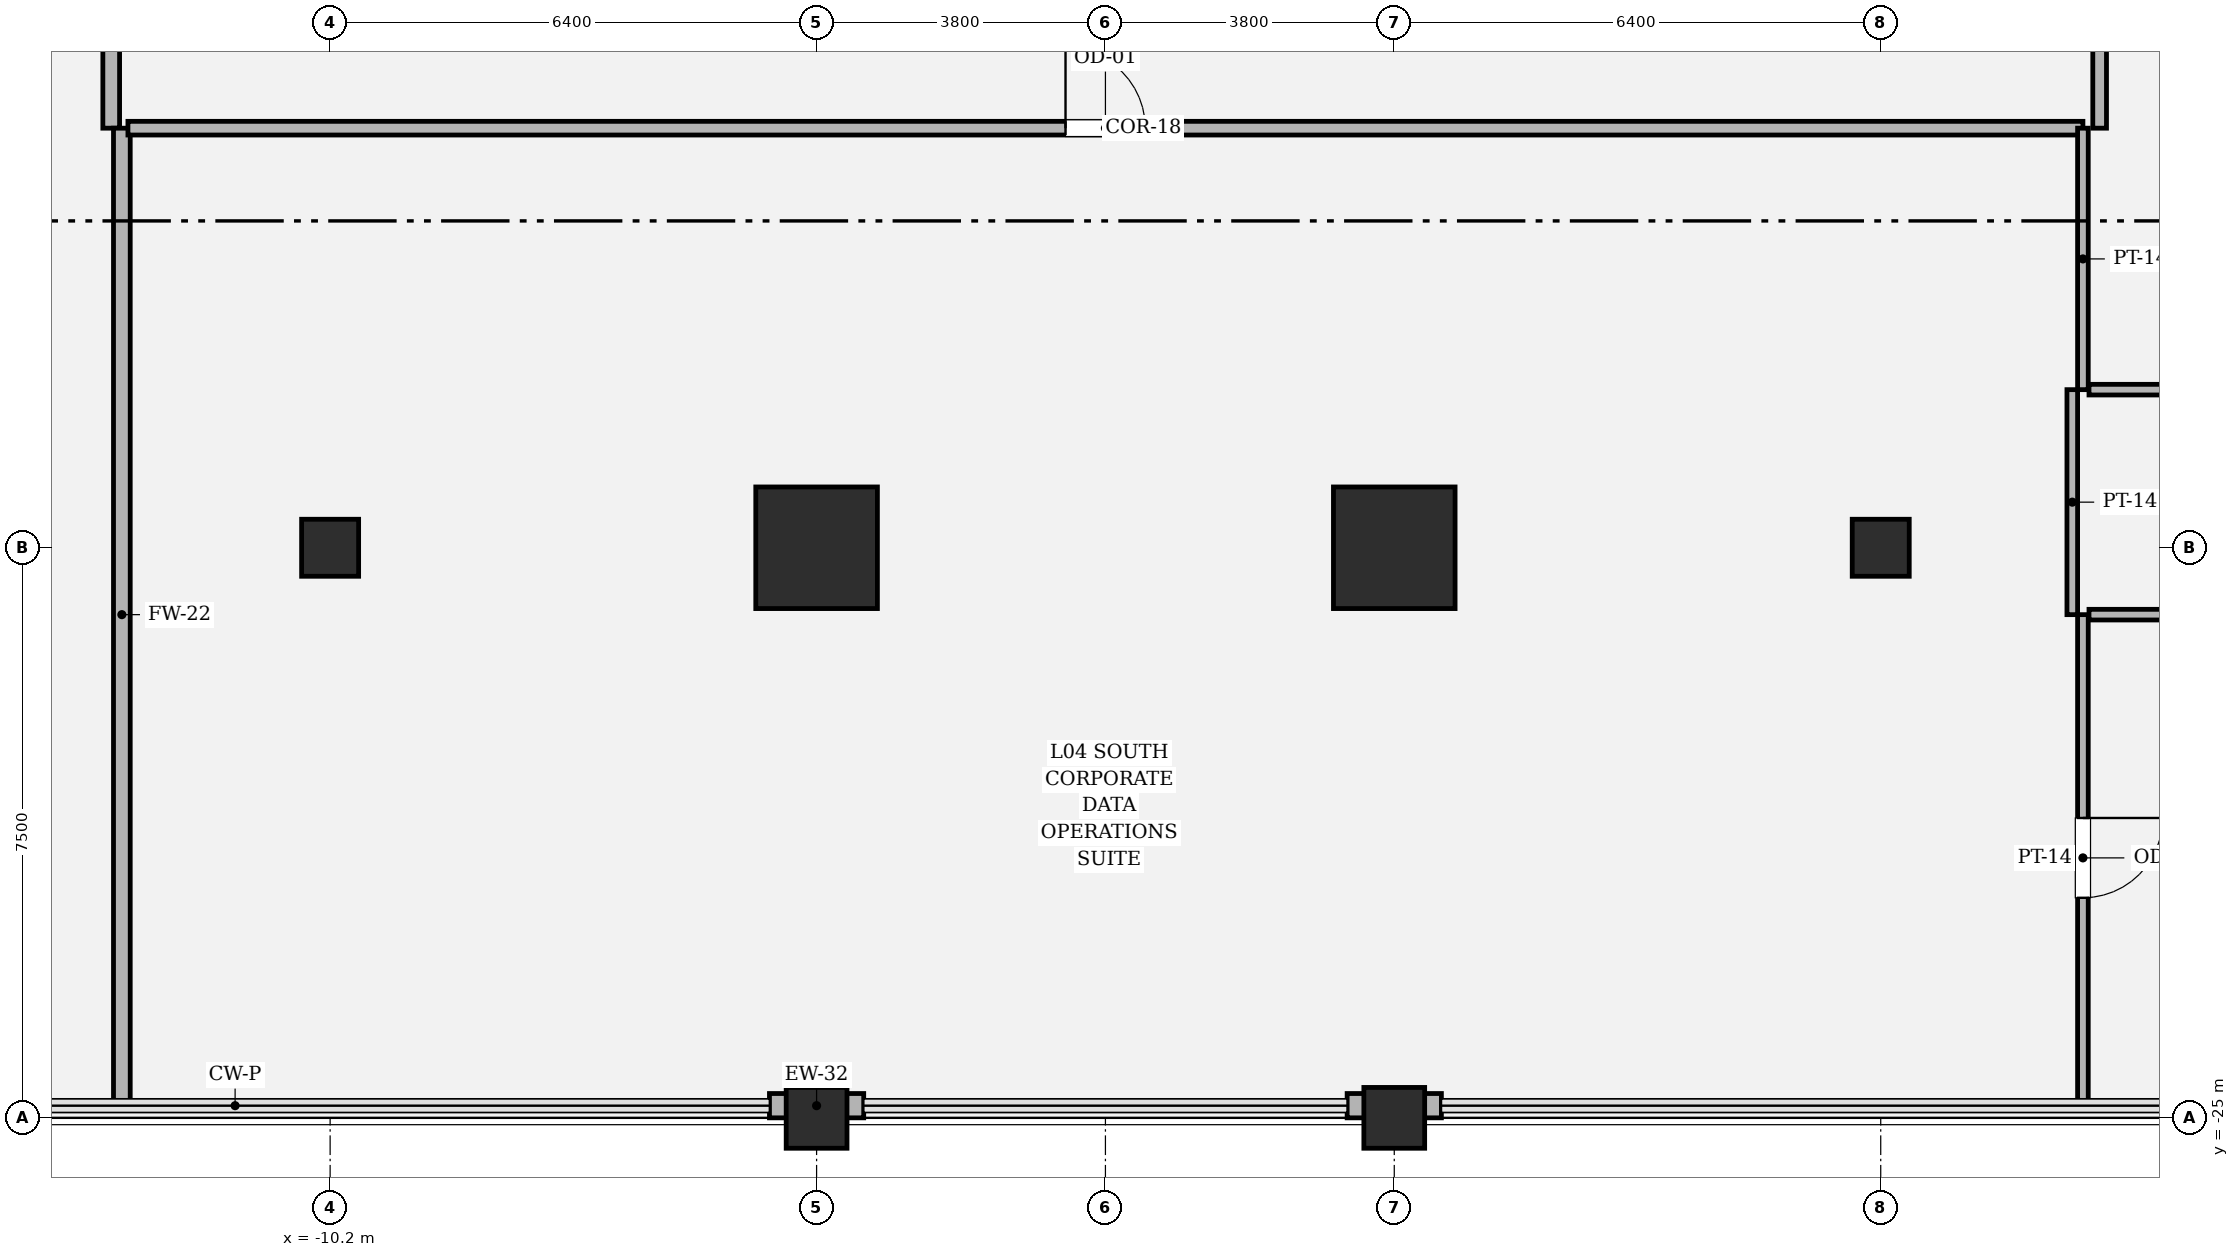
"""IFC4 building model, lengths in metres.
Left out: names, types, materials, properties, quantities, classifications, styles, units other than length and angle.
Written with IfcOpenShell. Run it as: python <this file> out.ifc"""

import sys

from ifc_helpers import new_model, si_unit, direction, frame, frame_2d, origin, origin_2d, place, context, subcontext, project, spatial, rectangle, hollow_rectangle, circle, extrude, element, fill, save


model = new_model("IFC4")
c1 = context("Model", 3, precision=1e-05, world=origin(), true_north=direction((0.0, 1.0)))
c2 = subcontext(c1, "Body", "Model", "MODEL_VIEW")
j1 = project(units=[si_unit("LENGTHUNIT", "METRE"), si_unit("PLANEANGLEUNIT", "RADIAN")], contexts=[c1])
p1 = place(None, origin())
s1 = spatial("IfcSite", under=j1, at=p1, CompositionType="ELEMENT")
p2 = place(p1, origin())
s2 = spatial("IfcBuilding", under=s1, at=p2, CompositionType="ELEMENT")
p3 = place(p2, frame((0.0, 0.0, 22.2)))
s3 = spatial("IfcBuildingStorey", under=s2, at=p3, CompositionType="ELEMENT", Elevation=22.2)
for number, where, z_axis, x_axis in (
    (1, (-3.8, -17.5, 0.0), (0.0, 0.0, 1.0), (1.0, 0.0, 0.0)),
    (2, (3.8, -17.5, 0.0), (0.0, 0.0, 1.0), (1.0, 0.0, 0.0)),
):
    element("IfcColumn", number, at=place(p3, frame(where, z_axis=z_axis, x_axis=x_axis)), inside=s3, PredefinedType="COLUMN", context=c2, shape_type="SweptSolid", body=[
        extrude(hollow_rectangle(XDim=1.6, YDim=1.6, WallThickness=0.05, at=origin_2d()), origin(), (0.0, 0.0, 1.0), 6.0),
    ])
for number, where, z_axis, x_axis in (
    (3, (-3.8, -25.0, 0.0), (0.0, 0.0, 1.0), (1.0, 0.0, 0.0)),
    (4, (3.8, -25.0, 0.0), (0.0, 0.0, 1.0), (1.0, 0.0, 0.0)),
):
    element("IfcColumn", number, at=place(p3, frame(where, z_axis=z_axis, x_axis=x_axis)), inside=s3, PredefinedType="COLUMN", context=c2, shape_type="SweptSolid", body=[
        extrude(rectangle(XDim=0.8, YDim=0.8, at=origin_2d()), origin(), (0.0, 0.0, 1.0), 6.0),
    ])
for number, where, z_axis, x_axis in (
    (5, (-10.2, -17.5, 0.0), (0.0, 0.0, 1.0), (1.0, 0.0, 0.0)),
    (6, (10.2, -17.5, 0.0), (0.0, 0.0, 1.0), (1.0, 0.0, 0.0)),
):
    element("IfcColumn", number, at=place(p3, frame(where, z_axis=z_axis, x_axis=x_axis)), inside=s3, PredefinedType="PILASTER", context=c2, shape_type="SweptSolid", body=[
        extrude(circle(Radius=0.375, at=origin_2d()), origin(), (0.0, 0.0, 1.0), 6.0),
    ])
for number, where, z_axis, x_axis in (
    (7, (-4.42, -24.84, 0.0), (0.0, 0.0, 1.0), (1.0, 0.0, 0.0)),
    (8, (3.18, -24.84, 0.0), (0.0, 0.0, 1.0), (1.0, 0.0, 0.0)),
):
    element("IfcWall", number, at=place(p3, frame(where, z_axis=z_axis, x_axis=x_axis)), inside=s3, PredefinedType="SOLIDWALL", context=c2, shape_type="SweptSolid", body=[
        extrude(rectangle(XDim=1.24, YDim=0.32, at=frame_2d((0.62, 0.0))), origin(), (0.0, 0.0, 1.0), 5.72),
    ])
p4 = place(p3, frame((-13.08, -1.38, 0.0), z_axis=(0.0, 0.0, 1.0), x_axis=(0.0, -1.0, 0.0)))
e9 = element("IfcWall", 9, at=p4, inside=s3, PredefinedType="SOLIDWALL", context=c2, shape_type="SweptSolid", body=[
    extrude(rectangle(XDim=10.6, YDim=0.22, at=frame_2d((5.3, 0.0))), origin(), (0.0, 0.0, 1.0), 4.394),
])
p5 = place(p3, frame((-12.94, -11.98, 0.0), z_axis=(0.0, 0.0, 1.0), x_axis=(0.0, -1.0, 0.0)))
e10 = element("IfcWall", 10, at=p5, inside=s3, PredefinedType="SOLIDWALL", context=c2, shape_type="SweptSolid", body=[
    extrude(rectangle(XDim=12.8, YDim=0.22, at=frame_2d((6.4, 0.0))), origin(), (0.0, 0.0, 1.0), 4.394),
])
p6 = place(p3, frame((-12.86, -11.98, 0.0), z_axis=(0.0, 0.0, 1.0), x_axis=(1.0, 0.0, 0.0)))
e11 = element("IfcWall", 11, at=p6, inside=s3, PredefinedType="PARTITIONING", context=c2, shape_type="SweptSolid", body=[
    extrude(rectangle(XDim=25.72, YDim=0.18, at=frame_2d((12.86, 0.0))), origin(), (0.0, 0.0, 1.0), 4.394),
])
p7 = place(p6, frame((12.335, 0.0, 0.0)))
e12 = element("IfcOpeningElement", 12, at=p7, cuts=e11, PredefinedType="OPENING", context=c2, shape_type="SweptSolid", body=[
    extrude(rectangle(XDim=1.05, YDim=2.2, at=frame_2d((0.525, 1.1))), frame((0.0, 0.1, 0.0), z_axis=(0.0, -1.0, 0.0), x_axis=(1.0, 0.0, 0.0)), (0.0, 0.0, 1.0), 0.2),
])
p8 = place(p3, frame((12.86, -11.98, 0.0), z_axis=(0.0, 0.0, 1.0), x_axis=(0.0, -1.0, 0.0)))
e13 = element("IfcWall", 13, at=p8, inside=s3, PredefinedType="PARTITIONING", context=c2, shape_type="SweptSolid", body=[
    extrude(rectangle(XDim=3.44, YDim=0.14, at=frame_2d((1.72, 0.0))), origin(), (0.0, 0.0, 1.0), 5.264),
])
p9 = place(p3, frame((12.72, -15.42, 0.0), z_axis=(0.0, 0.0, 1.0), x_axis=(0.0, -1.0, 0.0)))
e14 = element("IfcWall", 14, at=p9, inside=s3, PredefinedType="PARTITIONING", context=c2, shape_type="SweptSolid", body=[
    extrude(rectangle(XDim=2.96, YDim=0.14, at=frame_2d((1.48, 0.0))), origin(), (0.0, 0.0, 1.0), 4.394),
])
p10 = place(p3, frame((12.86, -18.38, 0.0), z_axis=(0.0, 0.0, 1.0), x_axis=(0.0, -1.0, 0.0)))
e15 = element("IfcWall", 15, at=p10, inside=s3, PredefinedType="PARTITIONING", context=c2, shape_type="SweptSolid", body=[
    extrude(rectangle(XDim=6.4, YDim=0.14, at=frame_2d((3.2, 0.0))), origin(), (0.0, 0.0, 1.0), 4.394),
])
p11 = place(p10, frame((2.675, 0.0, 0.0)))
e16 = element("IfcOpeningElement", 16, at=p11, cuts=e15, PredefinedType="OPENING", context=c2, shape_type="SweptSolid", body=[
    extrude(rectangle(XDim=1.05, YDim=2.2, at=frame_2d((0.525, 1.1))), frame((0.0, 0.08, 0.0), z_axis=(0.0, -1.0, 0.0), x_axis=(1.0, 0.0, 0.0)), (0.0, 0.0, 1.0), 0.16),
])
p12 = place(p3, frame((18.98, -15.42, 0.0), z_axis=(0.0, 0.0, 1.0), x_axis=(-1.0, 0.0, 0.0)))
e17 = element("IfcWall", 17, at=p12, inside=s3, PredefinedType="PARTITIONING", context=c2, shape_type="SweptSolid", body=[
    extrude(rectangle(XDim=6.04, YDim=0.14, at=frame_2d((3.02, 0.0))), origin(), (0.0, 0.0, 1.0), 4.394),
])
p13 = place(p3, frame((13.08, -11.98, 0.0), z_axis=(0.0, 0.0, 1.0), x_axis=(0.0, 1.0, 0.0)))
e18 = element("IfcWall", 18, at=p13, inside=s3, PredefinedType="PARTITIONING", context=c2, shape_type="SweptSolid", body=[
    extrude(rectangle(XDim=10.6, YDim=0.18, at=frame_2d((5.3, 0.0))), origin(), (0.0, 0.0, 1.0), 4.394),
])
p14 = place(p13, frame((4.775, 0.0, 0.0)))
e19 = element("IfcOpeningElement", 19, at=p14, cuts=e18, PredefinedType="OPENING", context=c2, shape_type="SweptSolid", body=[
    extrude(rectangle(XDim=1.05, YDim=2.2, at=frame_2d((0.525, 1.1))), frame((0.0, 0.1, 0.0), z_axis=(0.0, -1.0, 0.0), x_axis=(1.0, 0.0, 0.0)), (0.0, 0.0, 1.0), 0.2),
])
p15 = place(p3, frame((12.94, -18.38, 0.0), z_axis=(0.0, 0.0, 1.0), x_axis=(1.0, 0.0, 0.0)))
e20 = element("IfcWall", 20, at=p15, inside=s3, PredefinedType="PARTITIONING", context=c2, shape_type="SweptSolid", body=[
    extrude(rectangle(XDim=6.04, YDim=0.14, at=frame_2d((3.02, 0.0))), origin(), (0.0, 0.0, 1.0), 4.394),
])
p16 = place(p7, origin())
e21 = element("IfcDoor", 21, at=p16, inside=s3, OperationType="SINGLE_SWING_LEFT", PredefinedType="DOOR", context=c2, shape_type="SweptSolid", body=[
    extrude(rectangle(XDim=1.05, YDim=2.2, at=frame_2d((0.525, 1.1))), frame((0.0, 0.025, 0.0), z_axis=(0.0, -1.0, 0.0), x_axis=(1.0, 0.0, 0.0)), (0.0, 0.0, 1.0), 0.05),
])
fill(e12, e21)
p17 = place(p11, origin())
e22 = element("IfcDoor", 22, at=p17, inside=s3, OperationType="SINGLE_SWING_LEFT", PredefinedType="DOOR", context=c2, shape_type="SweptSolid", body=[
    extrude(rectangle(XDim=1.05, YDim=2.2, at=frame_2d((0.525, 1.1))), frame((0.0, 0.025, 0.0), z_axis=(0.0, -1.0, 0.0), x_axis=(1.0, 0.0, 0.0)), (0.0, 0.0, 1.0), 0.05),
])
fill(e16, e22)
save(model, sys.argv[1])
